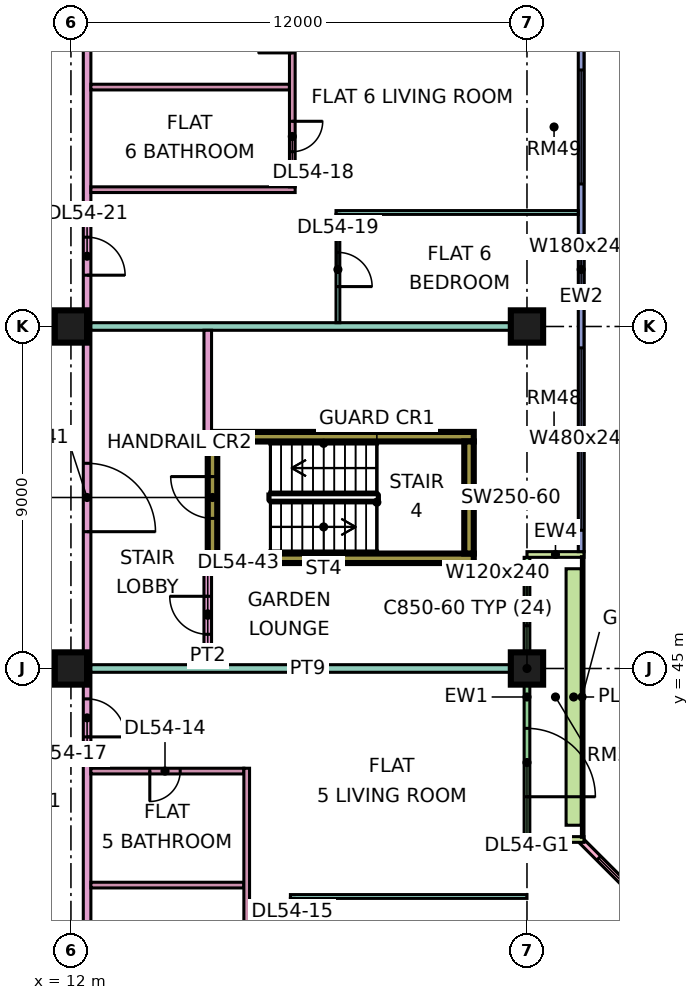
"""IFC4 building model, lengths in metres.
Left out: names, types, materials, properties, quantities, classifications, styles, units other than length and angle.
Written with IfcOpenShell. Run it as: python <this file> out.ifc"""

import sys

from ifc_helpers import new_model, si_unit, direction, frame, frame_2d, origin, origin_2d, place, context, subcontext, project, spatial, rectangle, extrude, element, fill, save


model = new_model("IFC4")
c1 = context("Model", 3, precision=1e-05, world=origin(), true_north=direction((0.0, 1.0)))
c2 = subcontext(c1, "Body", "Model", "MODEL_VIEW")
j1 = project(units=[si_unit("LENGTHUNIT", "METRE"), si_unit("PLANEANGLEUNIT", "RADIAN")], contexts=[c1])
p1 = place(None, origin())
s1 = spatial("IfcSite", under=j1, at=p1, CompositionType="ELEMENT")
p2 = place(p1, origin())
s2 = spatial("IfcBuilding", under=s1, at=p2, CompositionType="ELEMENT")
p3 = place(p2, frame((0.0, 0.0, 230.4)))
s3 = spatial("IfcBuildingStorey", under=s2, at=p3, CompositionType="ELEMENT", Elevation=230.4)
for number, where, z_axis, x_axis in (
    (1, (12.0, 45.0, 0.0), (0.0, 0.0, 1.0), (1.0, 0.0, 0.0)),
    (2, (12.0, 54.0, 0.0), (0.0, 0.0, 1.0), (1.0, 0.0, 0.0)),
    (3, (24.0, 45.0, 0.0), (0.0, 0.0, 1.0), (1.0, 0.0, 0.0)),
    (4, (24.0, 54.0, 0.0), (0.0, 0.0, 1.0), (1.0, 0.0, 0.0)),
):
    element("IfcColumn", number, at=place(p3, frame(where, z_axis=z_axis, x_axis=x_axis)), inside=s3, PredefinedType="COLUMN", context=c2, shape_type="SweptSolid", body=[
        extrude(rectangle(XDim=0.85, YDim=0.85, at=origin_2d()), origin(), (0.0, 0.0, 1.0), 3.75),
    ])
for number, where, z_axis, x_axis in (
    (5, (15.6, 47.9, 0.0), (0.0, 0.0, 1.0), (1.0, 0.0, 0.0)),
    (6, (15.6, 51.1, 0.0), (0.0, 0.0, 1.0), (1.0, 0.0, 0.0)),
):
    element("IfcWall", number, at=place(p3, frame(where, z_axis=z_axis, x_axis=x_axis)), inside=s3, PredefinedType="SHEAR", context=c2, shape_type="SweptSolid", body=[
        extrude(rectangle(XDim=7.0, YDim=0.25, at=frame_2d((3.5, 0.0))), origin(), (0.0, 0.0, 1.0), 3.75),
    ])
p4 = place(p3, frame((15.725, 48.025, 0.0), z_axis=(0.0, 0.0, 1.0), x_axis=(0.0, 1.0, 0.0)))
e7 = element("IfcWall", 7, at=p4, inside=s3, PredefinedType="SHEAR", context=c2, shape_type="SweptSolid", body=[
    extrude(rectangle(XDim=2.95, YDim=0.25, at=frame_2d((1.475, 0.0))), origin(), (0.0, 0.0, 1.0), 3.75),
])
p5 = place(p4, frame((0.925, 0.0, 0.0)))
e8 = element("IfcOpeningElement", 8, at=p5, cuts=e7, PredefinedType="OPENING", context=c2, shape_type="SweptSolid", body=[
    extrude(rectangle(XDim=1.1, YDim=2.2, at=frame_2d((0.55, 1.1))), frame((0.0, 0.135, 0.0), z_axis=(0.0, -1.0, 0.0), x_axis=(1.0, 0.0, 0.0)), (0.0, 0.0, 1.0), 0.27),
])
p6 = place(p3, frame((22.475, 48.025, 0.0), z_axis=(0.0, 0.0, 1.0), x_axis=(0.0, 1.0, 0.0)))
e9 = element("IfcWall", 9, at=p6, inside=s3, PredefinedType="SHEAR", context=c2, shape_type="SweptSolid", body=[
    extrude(rectangle(XDim=2.95, YDim=0.25, at=frame_2d((1.475, 0.0))), origin(), (0.0, 0.0, 1.0), 3.75),
])
p7 = place(p3, frame((28.447, 37.447, 0.0), z_axis=(0.0, 0.0, 1.0), x_axis=(-0.707106781187, 0.707106781187, 0.0)))
e10 = element("IfcWall", 10, at=p7, inside=s3, PredefinedType="SOLIDWALL", context=c2, shape_type="SweptSolid", body=[
    extrude(rectangle(XDim=4.243, YDim=0.15, at=frame_2d((2.121, 0.0))), origin(), (0.0, 0.0, 1.0), 3.35),
])
p8 = place(p7, frame((0.621, 0.0, 0.45)))
e11 = element("IfcOpeningElement", 11, at=p8, cuts=e10, PredefinedType="OPENING", context=c2, shape_type="SweptSolid", body=[
    extrude(rectangle(XDim=3.0, YDim=2.4, at=frame_2d((1.5, 1.2))), frame((0.0, 0.085, 0.0), z_axis=(0.0, -1.0, 0.0), x_axis=(1.0, 0.0, 0.0)), (0.0, 0.0, 1.0), 0.17),
])
p9 = place(p3, frame((24.0, 40.575, 0.0), z_axis=(0.0, 0.0, 1.0), x_axis=(0.0, 1.0, 0.0)))
e12 = element("IfcWall", 12, at=p9, inside=s3, PredefinedType="SOLIDWALL", context=c2, shape_type="SweptSolid", body=[
    extrude(rectangle(XDim=7.35, YDim=0.15, at=frame_2d((3.675, 0.0))), origin(), (0.0, 0.0, 1.0), 3.35),
])
p10 = place(p9, frame((1.05, 0.0, 0.0)))
e13 = element("IfcOpeningElement", 13, at=p10, cuts=e12, PredefinedType="OPENING", context=c2, shape_type="SweptSolid", body=[
    extrude(rectangle(XDim=1.8, YDim=2.4, at=frame_2d((0.9, 1.2))), frame((0.0, 0.085, 0.0), z_axis=(0.0, -1.0, 0.0), x_axis=(1.0, 0.0, 0.0)), (0.0, 0.0, 1.0), 0.17),
])
p11 = place(p9, frame((5.55, 0.0, 0.45)))
e14 = element("IfcOpeningElement", 14, at=p11, cuts=e12, PredefinedType="OPENING", context=c2, shape_type="SweptSolid", body=[
    extrude(rectangle(XDim=1.2, YDim=2.4, at=frame_2d((0.6, 1.2))), frame((0.0, 0.085, 0.0), z_axis=(0.0, -1.0, 0.0), x_axis=(1.0, 0.0, 0.0)), (0.0, 0.0, 1.0), 0.17),
])
for number, where, z_axis, x_axis in (
    (15, (25.5, 40.5, 0.0), (0.0, 0.0, 1.0), (-1.0, 0.0, 0.0)),
    (16, (25.5, 48.0, 0.0), (0.0, 0.0, 1.0), (-1.0, 0.0, 0.0)),
):
    element("IfcWall", number, at=place(p3, frame(where, z_axis=z_axis, x_axis=x_axis)), inside=s3, PredefinedType="SOLIDWALL", context=c2, shape_type="SweptSolid", body=[
        extrude(rectangle(XDim=1.5, YDim=0.15, at=frame_2d((0.75, 0.0))), origin(), (0.0, 0.0, 1.0), 3.35),
    ])
p12 = place(p3, frame((25.425, 48.075, 0.0), z_axis=(0.0, 0.0, 1.0), x_axis=(0.0, 1.0, 0.0)))
e17 = element("IfcWall", 17, at=p12, inside=s3, PredefinedType="SOLIDWALL", context=c2, shape_type="SweptSolid", body=[
    extrude(rectangle(XDim=13.425, YDim=0.15, at=frame_2d((6.712, 0.0))), origin(), (0.0, 0.0, 1.0), 3.35),
])
p13 = place(p12, frame((0.562, 0.0, 0.45)))
e18 = element("IfcOpeningElement", 18, at=p13, cuts=e17, PredefinedType="OPENING", context=c2, shape_type="SweptSolid", body=[
    extrude(rectangle(XDim=4.8, YDim=2.4, at=frame_2d((2.4, 1.2))), frame((0.0, 0.085, 0.0), z_axis=(0.0, -1.0, 0.0), x_axis=(1.0, 0.0, 0.0)), (0.0, 0.0, 1.0), 0.17),
])
p14 = place(p12, frame((6.525, 0.0, 0.45)))
e19 = element("IfcOpeningElement", 19, at=p14, cuts=e17, PredefinedType="OPENING", context=c2, shape_type="SweptSolid", body=[
    extrude(rectangle(XDim=1.8, YDim=2.4, at=frame_2d((0.9, 1.2))), frame((0.0, 0.085, 0.0), z_axis=(0.0, -1.0, 0.0), x_axis=(1.0, 0.0, 0.0)), (0.0, 0.0, 1.0), 0.17),
])
p15 = place(p12, frame((9.675, 0.0, 0.45)))
e20 = element("IfcOpeningElement", 20, at=p15, cuts=e17, PredefinedType="OPENING", context=c2, shape_type="SweptSolid", body=[
    extrude(rectangle(XDim=3.0, YDim=2.4, at=frame_2d((1.5, 1.2))), frame((0.0, 0.085, 0.0), z_axis=(0.0, -1.0, 0.0), x_axis=(1.0, 0.0, 0.0)), (0.0, 0.0, 1.0), 0.17),
])
p16 = place(p3, frame((25.229, 40.875, 0.0), z_axis=(0.0, 0.0, 1.0), x_axis=(0.0, 1.0, 0.0)))
e21 = element("IfcWall", 21, at=p16, inside=s3, PredefinedType="SOLIDWALL", context=c2, shape_type="SweptSolid", body=[
    extrude(rectangle(XDim=6.75, YDim=0.4, at=frame_2d((3.375, 0.0))), origin(), (0.0, 0.0, 1.0), 0.7),
])
p17 = place(p3, frame((12.425, 20.0, 0.0), z_axis=(0.0, 0.0, 1.0), x_axis=(0.0, 1.0, 0.0)))
e22 = element("IfcWall", 22, at=p17, inside=s3, PredefinedType="PARTITIONING", context=c2, shape_type="SweptSolid", body=[
    extrude(rectangle(XDim=42.926, YDim=0.2, at=frame_2d((21.463, 0.0))), origin(), (0.0, 0.0, 1.0), 3.35),
])
p18 = place(p17, frame((6.7, 0.0, 0.0)))
e23 = element("IfcOpeningElement", 23, at=p18, cuts=e22, PredefinedType="OPENING", context=c2, shape_type="SweptSolid", body=[
    extrude(rectangle(XDim=1.6, YDim=2.1, at=frame_2d((0.8, 1.05))), frame((0.0, 0.11, 0.0), z_axis=(0.0, -1.0, 0.0), x_axis=(1.0, 0.0, 0.0)), (0.0, 0.0, 1.0), 0.22),
])
p19 = place(p17, frame((12.95, 0.0, 0.0)))
e24 = element("IfcOpeningElement", 24, at=p19, cuts=e22, PredefinedType="OPENING", context=c2, shape_type="SweptSolid", body=[
    extrude(rectangle(XDim=1.0, YDim=2.1, at=frame_2d((0.5, 1.05))), frame((0.0, 0.11, 0.0), z_axis=(0.0, -1.0, 0.0), x_axis=(1.0, 0.0, 0.0)), (0.0, 0.0, 1.0), 0.22),
])
p20 = place(p17, frame((23.2, 0.0, 0.0)))
e25 = element("IfcOpeningElement", 25, at=p20, cuts=e22, PredefinedType="OPENING", context=c2, shape_type="SweptSolid", body=[
    extrude(rectangle(XDim=1.0, YDim=2.1, at=frame_2d((0.5, 1.05))), frame((0.0, 0.11, 0.0), z_axis=(0.0, -1.0, 0.0), x_axis=(1.0, 0.0, 0.0)), (0.0, 0.0, 1.0), 0.22),
])
p21 = place(p17, frame((35.35, 0.0, 0.0)))
e26 = element("IfcOpeningElement", 26, at=p21, cuts=e22, PredefinedType="OPENING", context=c2, shape_type="SweptSolid", body=[
    extrude(rectangle(XDim=1.0, YDim=2.1, at=frame_2d((0.5, 1.05))), frame((0.0, 0.11, 0.0), z_axis=(0.0, -1.0, 0.0), x_axis=(1.0, 0.0, 0.0)), (0.0, 0.0, 1.0), 0.22),
])
p22 = place(p17, frame((1.15, 0.0, 0.0)))
e27 = element("IfcOpeningElement", 27, at=p22, cuts=e22, PredefinedType="OPENING", context=c2, shape_type="SweptSolid", body=[
    extrude(rectangle(XDim=1.8, YDim=2.1, at=frame_2d((0.9, 1.05))), frame((0.0, 0.11, 0.0), z_axis=(0.0, -1.0, 0.0), x_axis=(1.0, 0.0, 0.0)), (0.0, 0.0, 1.0), 0.22),
])
p23 = place(p17, frame((28.6, 0.0, 0.0)))
e28 = element("IfcOpeningElement", 28, at=p23, cuts=e22, PredefinedType="OPENING", context=c2, shape_type="SweptSolid", body=[
    extrude(rectangle(XDim=1.8, YDim=2.1, at=frame_2d((0.9, 1.05))), frame((0.0, 0.11, 0.0), z_axis=(0.0, -1.0, 0.0), x_axis=(1.0, 0.0, 0.0)), (0.0, 0.0, 1.0), 0.22),
])
p24 = place(p3, frame((12.525, 39.3, 0.0), z_axis=(0.0, 0.0, 1.0), x_axis=(1.0, 0.0, 0.0)))
e29 = element("IfcWall", 29, at=p24, inside=s3, PredefinedType="PARTITIONING", context=c2, shape_type="SweptSolid", body=[
    extrude(rectangle(XDim=4.025, YDim=0.15, at=frame_2d((2.013, 0.0))), origin(), (0.0, 0.0, 1.0), 3.35),
])
p25 = place(p3, frame((12.525, 42.3, 0.0), z_axis=(0.0, 0.0, 1.0), x_axis=(1.0, 0.0, 0.0)))
e30 = element("IfcWall", 30, at=p25, inside=s3, PredefinedType="PARTITIONING", context=c2, shape_type="SweptSolid", body=[
    extrude(rectangle(XDim=4.025, YDim=0.15, at=frame_2d((2.013, 0.0))), origin(), (0.0, 0.0, 1.0), 3.35),
])
p26 = place(p25, frame((1.55, 0.0, 0.0)))
e31 = element("IfcOpeningElement", 31, at=p26, cuts=e30, PredefinedType="OPENING", context=c2, shape_type="SweptSolid", body=[
    extrude(rectangle(XDim=0.8, YDim=2.1, at=frame_2d((0.4, 1.05))), frame((0.0, 0.085, 0.0), z_axis=(0.0, -1.0, 0.0), x_axis=(1.0, 0.0, 0.0)), (0.0, 0.0, 1.0), 0.17),
])
p27 = place(p3, frame((12.525, 45.0, 0.0), z_axis=(0.0, 0.0, 1.0), x_axis=(1.0, 0.0, 0.0)))
e32 = element("IfcWall", 32, at=p27, inside=s3, PredefinedType="PARTITIONING", context=c2, shape_type="SweptSolid", body=[
    extrude(rectangle(XDim=11.401, YDim=0.2, at=frame_2d((5.701, 0.0))), origin(), (0.0, 0.0, 1.0), 3.35),
])
p28 = place(p3, frame((12.525, 54.0, 0.0), z_axis=(0.0, 0.0, 1.0), x_axis=(1.0, 0.0, 0.0)))
e33 = element("IfcWall", 33, at=p28, inside=s3, PredefinedType="PARTITIONING", context=c2, shape_type="SweptSolid", body=[
    extrude(rectangle(XDim=11.475, YDim=0.2, at=frame_2d((5.738, 0.0))), origin(), (0.0, 0.0, 1.0), 3.35),
])
p29 = place(p3, frame((12.525, 57.6, 0.0), z_axis=(0.0, 0.0, 1.0), x_axis=(1.0, 0.0, 0.0)))
e34 = element("IfcWall", 34, at=p29, inside=s3, PredefinedType="PARTITIONING", context=c2, shape_type="SweptSolid", body=[
    extrude(rectangle(XDim=5.375, YDim=0.15, at=frame_2d((2.688, 0.0))), origin(), (0.0, 0.0, 1.0), 3.35),
])
p30 = place(p3, frame((12.525, 60.3, 0.0), z_axis=(0.0, 0.0, 1.0), x_axis=(1.0, 0.0, 0.0)))
e35 = element("IfcWall", 35, at=p30, inside=s3, PredefinedType="PARTITIONING", context=c2, shape_type="SweptSolid", body=[
    extrude(rectangle(XDim=5.225, YDim=0.15, at=frame_2d((2.613, 0.0))), origin(), (0.0, 0.0, 1.0), 3.35),
])
p31 = place(p3, frame((15.6, 45.1, 0.0), z_axis=(0.0, 0.0, 1.0), x_axis=(0.0, 1.0, 0.0)))
e36 = element("IfcWall", 36, at=p31, inside=s3, PredefinedType="PARTITIONING", context=c2, shape_type="SweptSolid", body=[
    extrude(rectangle(XDim=2.675, YDim=0.2, at=frame_2d((1.337, 0.0))), origin(), (0.0, 0.0, 1.0), 3.35),
])
p32 = place(p31, frame((0.8, 0.0, 0.0)))
e37 = element("IfcOpeningElement", 37, at=p32, cuts=e36, PredefinedType="OPENING", context=c2, shape_type="SweptSolid", body=[
    extrude(rectangle(XDim=1.0, YDim=2.1, at=frame_2d((0.5, 1.05))), frame((0.0, 0.11, 0.0), z_axis=(0.0, -1.0, 0.0), x_axis=(1.0, 0.0, 0.0)), (0.0, 0.0, 1.0), 0.22),
])
p33 = place(p3, frame((15.6, 51.225, 0.0), z_axis=(0.0, 0.0, 1.0), x_axis=(0.0, 1.0, 0.0)))
e38 = element("IfcWall", 38, at=p33, inside=s3, PredefinedType="PARTITIONING", context=c2, shape_type="SweptSolid", body=[
    extrude(rectangle(XDim=2.675, YDim=0.2, at=frame_2d((1.337, 0.0))), origin(), (0.0, 0.0, 1.0), 3.35),
])
p34 = place(p3, frame((16.625, 36.1, 0.0), z_axis=(0.0, 0.0, 1.0), x_axis=(0.0, 1.0, 0.0)))
e39 = element("IfcWall", 39, at=p34, inside=s3, PredefinedType="PARTITIONING", context=c2, shape_type="SweptSolid", body=[
    extrude(rectangle(XDim=6.275, YDim=0.15, at=frame_2d((3.137, 0.0))), origin(), (0.0, 0.0, 1.0), 3.35),
])
p35 = place(p34, frame((1.1, 0.0, 0.0)))
e40 = element("IfcOpeningElement", 40, at=p35, cuts=e39, PredefinedType="OPENING", context=c2, shape_type="SweptSolid", body=[
    extrude(rectangle(XDim=0.9, YDim=2.1, at=frame_2d((0.45, 1.05))), frame((0.0, 0.085, 0.0), z_axis=(0.0, -1.0, 0.0), x_axis=(1.0, 0.0, 0.0)), (0.0, 0.0, 1.0), 0.17),
])
p36 = place(p3, frame((17.775, 39.0, 0.0), z_axis=(0.0, 0.0, 1.0), x_axis=(1.0, 0.0, 0.0)))
e41 = element("IfcWall", 41, at=p36, inside=s3, PredefinedType="PARTITIONING", context=c2, shape_type="SweptSolid", body=[
    extrude(rectangle(XDim=6.225, YDim=0.1, at=frame_2d((3.113, 0.0))), origin(), (0.0, 0.0, 1.0), 3.35),
])
p37 = place(p3, frame((17.825, 36.1, 0.0), z_axis=(0.0, 0.0, 1.0), x_axis=(0.0, 1.0, 0.0)))
e42 = element("IfcWall", 42, at=p37, inside=s3, PredefinedType="PARTITIONING", context=c2, shape_type="SweptSolid", body=[
    extrude(rectangle(XDim=2.85, YDim=0.1, at=frame_2d((1.425, 0.0))), origin(), (0.0, 0.0, 1.0), 3.35),
])
p38 = place(p37, frame((0.95, 0.0, 0.0)))
e43 = element("IfcOpeningElement", 43, at=p38, cuts=e42, PredefinedType="OPENING", context=c2, shape_type="SweptSolid", body=[
    extrude(rectangle(XDim=0.9, YDim=2.1, at=frame_2d((0.45, 1.05))), frame((0.0, 0.06, 0.0), z_axis=(0.0, -1.0, 0.0), x_axis=(1.0, 0.0, 0.0)), (0.0, 0.0, 1.0), 0.12),
])
p39 = place(p3, frame((17.825, 57.675, 0.0), z_axis=(0.0, 0.0, 1.0), x_axis=(0.0, 1.0, 0.0)))
e44 = element("IfcWall", 44, at=p39, inside=s3, PredefinedType="PARTITIONING", context=c2, shape_type="SweptSolid", body=[
    extrude(rectangle(XDim=5.251, YDim=0.15, at=frame_2d((2.625, 0.0))), origin(), (0.0, 0.0, 1.0), 3.35),
])
p40 = place(p39, frame((0.925, 0.0, 0.0)))
e45 = element("IfcOpeningElement", 45, at=p40, cuts=e44, PredefinedType="OPENING", context=c2, shape_type="SweptSolid", body=[
    extrude(rectangle(XDim=0.8, YDim=2.1, at=frame_2d((0.4, 1.05))), frame((0.0, 0.085, 0.0), z_axis=(0.0, -1.0, 0.0), x_axis=(1.0, 0.0, 0.0)), (0.0, 0.0, 1.0), 0.17),
])
p41 = place(p39, frame((3.525, 0.0, 0.0)))
e46 = element("IfcOpeningElement", 46, at=p41, cuts=e44, PredefinedType="OPENING", context=c2, shape_type="SweptSolid", body=[
    extrude(rectangle(XDim=0.9, YDim=2.1, at=frame_2d((0.45, 1.05))), frame((0.0, 0.085, 0.0), z_axis=(0.0, -1.0, 0.0), x_axis=(1.0, 0.0, 0.0)), (0.0, 0.0, 1.0), 0.17),
])
p42 = place(p3, frame((18.975, 57.0, 0.0), z_axis=(0.0, 0.0, 1.0), x_axis=(1.0, 0.0, 0.0)))
e47 = element("IfcWall", 47, at=p42, inside=s3, PredefinedType="PARTITIONING", context=c2, shape_type="SweptSolid", body=[
    extrude(rectangle(XDim=6.375, YDim=0.1, at=frame_2d((3.188, 0.0))), origin(), (0.0, 0.0, 1.0), 3.35),
])
p43 = place(p3, frame((19.025, 54.1, 0.0), z_axis=(0.0, 0.0, 1.0), x_axis=(0.0, 1.0, 0.0)))
e48 = element("IfcWall", 48, at=p43, inside=s3, PredefinedType="PARTITIONING", context=c2, shape_type="SweptSolid", body=[
    extrude(rectangle(XDim=2.85, YDim=0.1, at=frame_2d((1.425, 0.0))), origin(), (0.0, 0.0, 1.0), 3.35),
])
p44 = place(p43, frame((0.95, 0.0, 0.0)))
e49 = element("IfcOpeningElement", 49, at=p44, cuts=e48, PredefinedType="OPENING", context=c2, shape_type="SweptSolid", body=[
    extrude(rectangle(XDim=0.9, YDim=2.1, at=frame_2d((0.45, 1.05))), frame((0.0, 0.06, 0.0), z_axis=(0.0, -1.0, 0.0), x_axis=(1.0, 0.0, 0.0)), (0.0, 0.0, 1.0), 0.12),
])
p45 = place(p8, origin())
e50 = element("IfcWindow", 50, at=p45, inside=s3, PartitioningType="SINGLE_PANEL", PredefinedType="WINDOW", context=c2, shape_type="SweptSolid", body=[
    extrude(rectangle(XDim=3.0, YDim=2.4, at=frame_2d((1.5, 1.2))), frame((0.0, 0.03, 0.0), z_axis=(0.0, -1.0, 0.0), x_axis=(1.0, 0.0, 0.0)), (0.0, 0.0, 1.0), 0.06),
])
fill(e11, e50)
p46 = place(p10, frame((1.8, 0.0, 0.0), z_axis=(0.0, 0.0, 1.0), x_axis=(-1.0, 0.0, 0.0)))
e51 = element("IfcDoor", 51, at=p46, inside=s3, OperationType="DOUBLE_DOOR_SINGLE_SWING", PredefinedType="DOOR", context=c2, shape_type="SweptSolid", body=[
    extrude(rectangle(XDim=1.8, YDim=2.4, at=frame_2d((0.9, 1.2))), frame((0.0, 0.025, 0.0), z_axis=(0.0, -1.0, 0.0), x_axis=(1.0, 0.0, 0.0)), (0.0, 0.0, 1.0), 0.05),
])
fill(e13, e51)
p47 = place(p11, origin())
e52 = element("IfcWindow", 52, at=p47, inside=s3, PartitioningType="SINGLE_PANEL", PredefinedType="WINDOW", context=c2, shape_type="SweptSolid", body=[
    extrude(rectangle(XDim=1.2, YDim=2.4, at=frame_2d((0.6, 1.2))), frame((0.0, 0.03, 0.0), z_axis=(0.0, -1.0, 0.0), x_axis=(1.0, 0.0, 0.0)), (0.0, 0.0, 1.0), 0.06),
])
fill(e14, e52)
p48 = place(p13, origin())
e53 = element("IfcWindow", 53, at=p48, inside=s3, PartitioningType="SINGLE_PANEL", PredefinedType="WINDOW", context=c2, shape_type="SweptSolid", body=[
    extrude(rectangle(XDim=4.8, YDim=2.4, at=frame_2d((2.4, 1.2))), frame((0.0, 0.03, 0.0), z_axis=(0.0, -1.0, 0.0), x_axis=(1.0, 0.0, 0.0)), (0.0, 0.0, 1.0), 0.06),
])
fill(e18, e53)
p49 = place(p14, origin())
e54 = element("IfcWindow", 54, at=p49, inside=s3, PartitioningType="SINGLE_PANEL", PredefinedType="WINDOW", context=c2, shape_type="SweptSolid", body=[
    extrude(rectangle(XDim=1.8, YDim=2.4, at=frame_2d((0.9, 1.2))), frame((0.0, 0.03, 0.0), z_axis=(0.0, -1.0, 0.0), x_axis=(1.0, 0.0, 0.0)), (0.0, 0.0, 1.0), 0.06),
])
fill(e19, e54)
p50 = place(p15, origin())
e55 = element("IfcWindow", 55, at=p50, inside=s3, PartitioningType="SINGLE_PANEL", PredefinedType="WINDOW", context=c2, shape_type="SweptSolid", body=[
    extrude(rectangle(XDim=3.0, YDim=2.4, at=frame_2d((1.5, 1.2))), frame((0.0, 0.03, 0.0), z_axis=(0.0, -1.0, 0.0), x_axis=(1.0, 0.0, 0.0)), (0.0, 0.0, 1.0), 0.06),
])
fill(e20, e55)
p51 = place(p5, frame((1.1, 0.0, 0.0), z_axis=(0.0, 0.0, 1.0), x_axis=(-1.0, 0.0, 0.0)))
e56 = element("IfcDoor", 56, at=p51, inside=s3, OperationType="SINGLE_SWING_RIGHT", PredefinedType="DOOR", context=c2, shape_type="SweptSolid", body=[
    extrude(rectangle(XDim=1.1, YDim=2.2, at=frame_2d((0.55, 1.1))), frame((0.0, 0.025, 0.0), z_axis=(0.0, -1.0, 0.0), x_axis=(1.0, 0.0, 0.0)), (0.0, 0.0, 1.0), 0.05),
])
fill(e8, e56)
p52 = place(p26, frame((0.8, 0.0, 0.0), z_axis=(0.0, 0.0, 1.0), x_axis=(-1.0, 0.0, 0.0)))
e57 = element("IfcDoor", 57, at=p52, inside=s3, OperationType="SINGLE_SWING_LEFT", PredefinedType="DOOR", context=c2, shape_type="SweptSolid", body=[
    extrude(rectangle(XDim=0.8, YDim=2.1, at=frame_2d((0.4, 1.05))), frame((0.0, 0.025, 0.0), z_axis=(0.0, -1.0, 0.0), x_axis=(1.0, 0.0, 0.0)), (0.0, 0.0, 1.0), 0.05),
])
fill(e31, e57)
p53 = place(p20, frame((1.0, 0.0, 0.0), z_axis=(0.0, 0.0, 1.0), x_axis=(-1.0, 0.0, 0.0)))
e58 = element("IfcDoor", 58, at=p53, inside=s3, OperationType="SINGLE_SWING_LEFT", PredefinedType="DOOR", context=c2, shape_type="SweptSolid", body=[
    extrude(rectangle(XDim=1.0, YDim=2.1, at=frame_2d((0.5, 1.05))), frame((0.0, 0.025, 0.0), z_axis=(0.0, -1.0, 0.0), x_axis=(1.0, 0.0, 0.0)), (0.0, 0.0, 1.0), 0.05),
])
fill(e25, e58)
p54 = place(p40, origin())
e59 = element("IfcDoor", 59, at=p54, inside=s3, OperationType="SINGLE_SWING_RIGHT", PredefinedType="DOOR", context=c2, shape_type="SweptSolid", body=[
    extrude(rectangle(XDim=0.8, YDim=2.1, at=frame_2d((0.4, 1.05))), frame((0.0, 0.025, 0.0), z_axis=(0.0, -1.0, 0.0), x_axis=(1.0, 0.0, 0.0)), (0.0, 0.0, 1.0), 0.05),
])
fill(e45, e59)
p55 = place(p44, frame((0.9, 0.0, 0.0), z_axis=(0.0, 0.0, 1.0), x_axis=(-1.0, 0.0, 0.0)))
e60 = element("IfcDoor", 60, at=p55, inside=s3, OperationType="SINGLE_SWING_LEFT", PredefinedType="DOOR", context=c2, shape_type="SweptSolid", body=[
    extrude(rectangle(XDim=0.9, YDim=2.1, at=frame_2d((0.45, 1.05))), frame((0.0, 0.025, 0.0), z_axis=(0.0, -1.0, 0.0), x_axis=(1.0, 0.0, 0.0)), (0.0, 0.0, 1.0), 0.05),
])
fill(e49, e60)
p56 = place(p41, origin())
e61 = element("IfcDoor", 61, at=p56, inside=s3, OperationType="SINGLE_SWING_LEFT", PredefinedType="DOOR", context=c2, shape_type="SweptSolid", body=[
    extrude(rectangle(XDim=0.9, YDim=2.1, at=frame_2d((0.45, 1.05))), frame((0.0, 0.025, 0.0), z_axis=(0.0, -1.0, 0.0), x_axis=(1.0, 0.0, 0.0)), (0.0, 0.0, 1.0), 0.05),
])
fill(e46, e61)
p57 = place(p21, frame((1.0, 0.0, 0.0), z_axis=(0.0, 0.0, 1.0), x_axis=(-1.0, 0.0, 0.0)))
e62 = element("IfcDoor", 62, at=p57, inside=s3, OperationType="SINGLE_SWING_LEFT", PredefinedType="DOOR", context=c2, shape_type="SweptSolid", body=[
    extrude(rectangle(XDim=1.0, YDim=2.1, at=frame_2d((0.5, 1.05))), frame((0.0, 0.025, 0.0), z_axis=(0.0, -1.0, 0.0), x_axis=(1.0, 0.0, 0.0)), (0.0, 0.0, 1.0), 0.05),
])
fill(e26, e62)
p58 = place(p23, frame((1.8, 0.0, 0.0), z_axis=(0.0, 0.0, 1.0), x_axis=(-1.0, 0.0, 0.0)))
e63 = element("IfcDoor", 63, at=p58, inside=s3, OperationType="DOUBLE_DOOR_SINGLE_SWING", PredefinedType="DOOR", context=c2, shape_type="SweptSolid", body=[
    extrude(rectangle(XDim=1.8, YDim=2.1, at=frame_2d((0.9, 1.05))), frame((0.0, 0.025, 0.0), z_axis=(0.0, -1.0, 0.0), x_axis=(1.0, 0.0, 0.0)), (0.0, 0.0, 1.0), 0.05),
])
fill(e28, e63)
p59 = place(p32, frame((1.0, 0.0, 0.0), z_axis=(0.0, 0.0, 1.0), x_axis=(-1.0, 0.0, 0.0)))
e64 = element("IfcDoor", 64, at=p59, inside=s3, OperationType="SINGLE_SWING_RIGHT", PredefinedType="DOOR", context=c2, shape_type="SweptSolid", body=[
    extrude(rectangle(XDim=1.0, YDim=2.1, at=frame_2d((0.5, 1.05))), frame((0.0, 0.025, 0.0), z_axis=(0.0, -1.0, 0.0), x_axis=(1.0, 0.0, 0.0)), (0.0, 0.0, 1.0), 0.05),
])
fill(e37, e64)
save(model, sys.argv[1])
